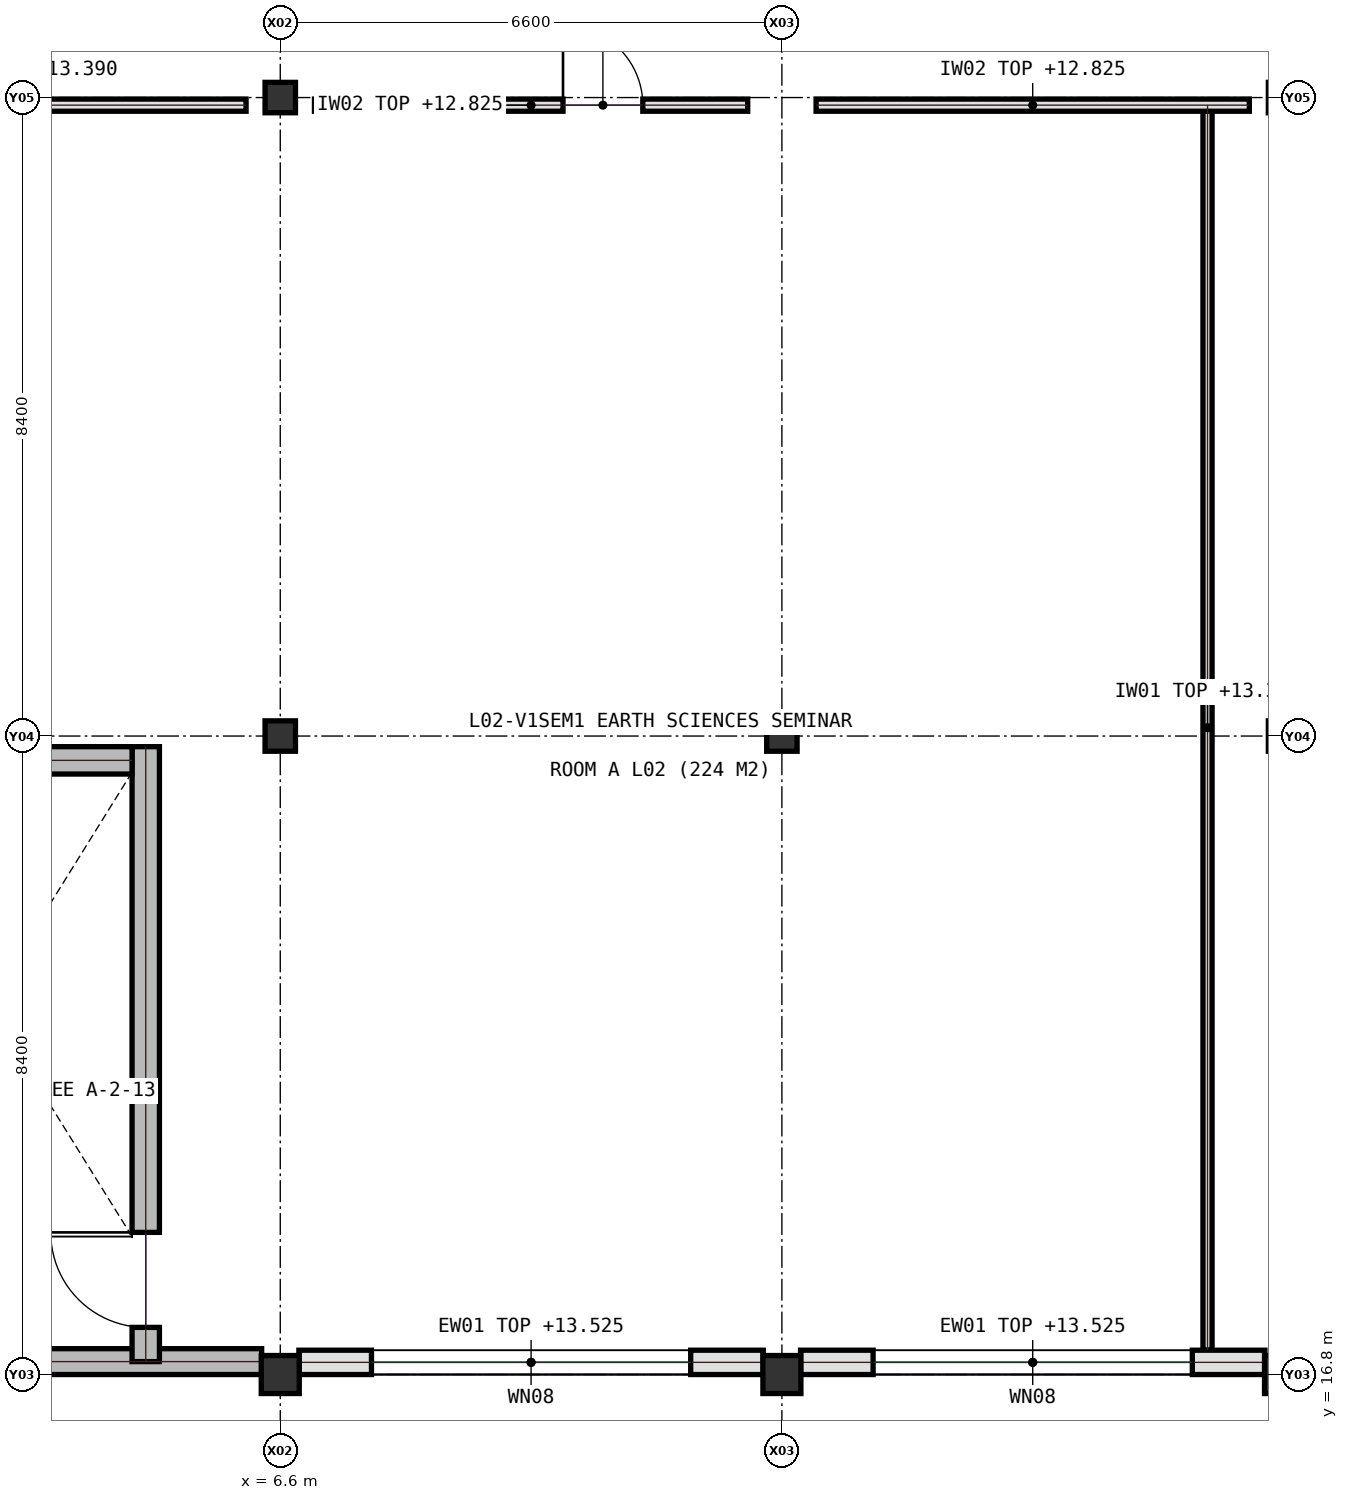
"""IFC4 building model, lengths in metres.
Left out: names, types, materials, properties, quantities, classifications, styles, units other than length and angle.
Written with IfcOpenShell. Run it as: python <this file> out.ifc"""

import sys

from ifc_helpers import new_model, si_unit, direction, frame, frame_2d, origin, origin_2d, place, context, subcontext, project, spatial, rectangle, extrude, element, fill, save


model = new_model("IFC4")
c1 = context("Model", 3, precision=1e-05, world=origin(), true_north=direction((0.0, 1.0)))
c2 = subcontext(c1, "Body", "Model", "MODEL_VIEW")
j1 = project(units=[si_unit("LENGTHUNIT", "METRE"), si_unit("PLANEANGLEUNIT", "RADIAN")], contexts=[c1])
p1 = place(None, origin())
s1 = spatial("IfcSite", under=j1, at=p1, CompositionType="ELEMENT")
p2 = place(p1, origin())
s2 = spatial("IfcBuilding", under=s1, at=p2, CompositionType="ELEMENT")
p3 = place(p2, frame((0.0, 0.0, 9.9)))
s3 = spatial("IfcBuildingStorey", under=s2, at=p3, CompositionType="ELEMENT", Elevation=9.9)
p4 = place(p3, frame((6.6, 16.8, 0.0), z_axis=(0.0, 0.0, 1.0), x_axis=(1.0, 0.0, 0.0)))
e1 = element("IfcColumn", 1, at=p4, inside=s3, PredefinedType="COLUMN", context=c2, shape_type="SweptSolid", body=[
    extrude(rectangle(XDim=0.5, YDim=0.5, at=origin_2d()), origin(), (0.0, 0.0, 1.0), 4.5),
])
for number, where, z_axis, x_axis in (
    (2, (6.6, 25.2, 0.0), (0.0, 0.0, 1.0), (1.0, 0.0, 0.0)),
    (3, (6.6, 33.6, 0.0), (0.0, 0.0, 1.0), (1.0, 0.0, 0.0)),
):
    element("IfcColumn", number, at=place(p3, frame(where, z_axis=z_axis, x_axis=x_axis)), inside=s3, PredefinedType="COLUMN", context=c2, shape_type="SweptSolid", body=[
        extrude(rectangle(XDim=0.4, YDim=0.4, at=origin_2d()), origin(), (0.0, 0.0, 1.0), 4.5),
    ])
p5 = place(p3, frame((13.2, 16.8, 0.0), z_axis=(0.0, 0.0, 1.0), x_axis=(1.0, 0.0, 0.0)))
e4 = element("IfcColumn", 4, at=p5, inside=s3, PredefinedType="COLUMN", context=c2, shape_type="SweptSolid", body=[
    extrude(rectangle(XDim=0.5, YDim=0.5, at=origin_2d()), origin(), (0.0, 0.0, 1.0), 4.5),
])
p6 = place(p3, frame((13.2, 25.2, 0.0), z_axis=(0.0, 0.0, 1.0), x_axis=(1.0, 0.0, 0.0)))
e5 = element("IfcColumn", 5, at=p6, inside=s3, PredefinedType="COLUMN", context=c2, shape_type="SweptSolid", body=[
    extrude(rectangle(XDim=0.4, YDim=0.4, at=origin_2d()), origin(), (0.0, 0.0, 1.0), 4.5),
])
p7 = place(p3, frame((19.8, 16.8, 0.0), z_axis=(0.0, 0.0, 1.0), x_axis=(1.0, 0.0, 0.0)))
e6 = element("IfcColumn", 6, at=p7, inside=s3, PredefinedType="COLUMN", context=c2, shape_type="SweptSolid", body=[
    extrude(rectangle(XDim=0.5, YDim=0.5, at=origin_2d()), origin(), (0.0, 0.0, 1.0), 4.5),
])
p8 = place(p3, frame((18.8, 17.12, 0.0), z_axis=(0.0, 0.0, 1.0), x_axis=(0.0, 1.0, 0.0)))
e7 = element("IfcWall", 7, at=p8, inside=s3, PredefinedType="PARTITIONING", context=c2, shape_type="SweptSolid", body=[
    extrude(rectangle(XDim=16.38, YDim=0.12, at=frame_2d((8.19, 0.0))), origin(), (0.0, 0.0, 1.0), 3.49),
])
p9 = place(p3, frame((0.32, 33.5, 0.0), z_axis=(0.0, 0.0, 1.0), x_axis=(1.0, 0.0, 0.0)))
e8 = element("IfcWall", 8, at=p9, inside=s3, PredefinedType="PARTITIONING", context=c2, shape_type="SweptSolid", body=[
    extrude(rectangle(XDim=5.83, YDim=0.16, at=frame_2d((2.915, 0.0))), origin(), (0.0, 0.0, 1.0), 3.49),
])
p10 = place(p3, frame((7.05, 33.5, 0.0), z_axis=(0.0, 0.0, 1.0), x_axis=(1.0, 0.0, 0.0)))
e9 = element("IfcWall", 9, at=p10, inside=s3, PredefinedType="PARTITIONING", context=c2, shape_type="SweptSolid", body=[
    extrude(rectangle(XDim=5.7, YDim=0.16, at=frame_2d((2.85, 0.0))), origin(), (0.0, 0.0, 1.0), 2.925),
])
p11 = place(p10, frame((3.27, 0.0, 0.0)))
e10 = element("IfcOpeningElement", 10, at=p11, cuts=e9, PredefinedType="OPENING", context=c2, shape_type="SweptSolid", body=[
    extrude(rectangle(XDim=1.05, YDim=2.15, at=frame_2d((0.525, 1.075))), frame((0.0, 0.09, 0.0), z_axis=(0.0, -1.0, 0.0), x_axis=(1.0, 0.0, 0.0)), (0.0, 0.0, 1.0), 0.18),
])
p12 = place(p3, frame((13.65, 33.5, 0.0), z_axis=(0.0, 0.0, 1.0), x_axis=(1.0, 0.0, 0.0)))
e11 = element("IfcWall", 11, at=p12, inside=s3, PredefinedType="PARTITIONING", context=c2, shape_type="SweptSolid", body=[
    extrude(rectangle(XDim=5.7, YDim=0.16, at=frame_2d((2.85, 0.0))), origin(), (0.0, 0.0, 1.0), 2.925),
])
p13 = place(p3, frame((0.245, 16.97, 0.0), z_axis=(0.0, 0.0, 1.0), x_axis=(1.0, 0.0, 0.0)))
e12 = element("IfcWall", 12, at=p13, inside=s3, PredefinedType="SHEAR", context=c2, shape_type="SweptSolid", body=[
    extrude(rectangle(XDim=6.11, YDim=0.34, at=frame_2d((3.055, 0.0))), origin(), (0.0, 0.0, 1.0), 4.24),
])
p14 = place(p3, frame((6.845, 16.96, 0.0), z_axis=(0.0, 0.0, 1.0), x_axis=(1.0, 0.0, 0.0)))
e13 = element("IfcWall", 13, at=p14, inside=s3, PredefinedType="SOLIDWALL", context=c2, shape_type="SweptSolid", body=[
    extrude(rectangle(XDim=6.11, YDim=0.32, at=frame_2d((3.055, 0.0))), origin(), (0.0, 0.0, 1.0), 3.625),
])
p15 = place(p14, frame((0.955, 0.0, 1.45)))
e14 = element("IfcOpeningElement", 14, at=p15, cuts=e13, PredefinedType="OPENING", context=c2, shape_type="SweptSolid", body=[
    extrude(rectangle(XDim=4.2, YDim=1.1, at=frame_2d((2.1, 0.55))), frame((0.0, 0.17, 0.0), z_axis=(0.0, -1.0, 0.0), x_axis=(1.0, 0.0, 0.0)), (0.0, 0.0, 1.0), 0.34),
])
p16 = place(p3, frame((13.445, 16.96, 0.0), z_axis=(0.0, 0.0, 1.0), x_axis=(1.0, 0.0, 0.0)))
e15 = element("IfcWall", 15, at=p16, inside=s3, PredefinedType="SOLIDWALL", context=c2, shape_type="SweptSolid", body=[
    extrude(rectangle(XDim=6.11, YDim=0.32, at=frame_2d((3.055, 0.0))), origin(), (0.0, 0.0, 1.0), 3.625),
])
p17 = place(p16, frame((0.955, 0.0, 1.45)))
e16 = element("IfcOpeningElement", 16, at=p17, cuts=e15, PredefinedType="OPENING", context=c2, shape_type="SweptSolid", body=[
    extrude(rectangle(XDim=4.2, YDim=1.1, at=frame_2d((2.1, 0.55))), frame((0.0, 0.17, 0.0), z_axis=(0.0, -1.0, 0.0), x_axis=(1.0, 0.0, 0.0)), (0.0, 0.0, 1.0), 0.34),
])
p18 = place(p3, frame((4.83, 16.97, 0.0), z_axis=(0.0, 0.0, 1.0), x_axis=(0.0, 1.0, 0.0)))
e17 = element("IfcWall", 17, at=p18, inside=s3, PredefinedType="SHEAR", context=c2, shape_type="SweptSolid", body=[
    extrude(rectangle(XDim=8.09, YDim=0.36, at=frame_2d((4.045, 0.0))), origin(), (0.0, 0.0, 1.0), 4.24),
])
p19 = place(p18, frame((0.45, 0.0, 0.0)))
e18 = element("IfcOpeningElement", 18, at=p19, cuts=e17, PredefinedType="OPENING", context=c2, shape_type="SweptSolid", body=[
    extrude(rectangle(XDim=1.25, YDim=2.15, at=frame_2d((0.625, 1.075))), frame((0.0, 0.19, 0.0), z_axis=(0.0, -1.0, 0.0), x_axis=(1.0, 0.0, 0.0)), (0.0, 0.0, 1.0), 0.38),
])
p20 = place(p3, frame((0.85, 24.88, 0.0), z_axis=(0.0, 0.0, 1.0), x_axis=(1.0, 0.0, 0.0)))
e19 = element("IfcWall", 19, at=p20, inside=s3, PredefinedType="SHEAR", context=c2, shape_type="SweptSolid", body=[
    extrude(rectangle(XDim=3.8, YDim=0.36, at=frame_2d((1.9, 0.0))), origin(), (0.0, 0.0, 1.0), 4.24),
])
p21 = place(p11, origin())
e20 = element("IfcDoor", 20, at=p21, inside=s3, OperationType="SINGLE_SWING_LEFT", PredefinedType="DOOR", context=c2, shape_type="SweptSolid", body=[
    extrude(rectangle(XDim=1.05, YDim=2.15, at=frame_2d((0.525, 1.075))), frame((0.0, 0.025, 0.0), z_axis=(0.0, -1.0, 0.0), x_axis=(1.0, 0.0, 0.0)), (0.0, 0.0, 1.0), 0.05),
])
fill(e10, e20)
p22 = place(p15, origin())
e21 = element("IfcWindow", 21, at=p22, inside=s3, PartitioningType="SINGLE_PANEL", PredefinedType="WINDOW", context=c2, shape_type="SweptSolid", body=[
    extrude(rectangle(XDim=4.2, YDim=1.1, at=frame_2d((2.1, 0.55))), frame((0.0, 0.03, 0.0), z_axis=(0.0, -1.0, 0.0), x_axis=(1.0, 0.0, 0.0)), (0.0, 0.0, 1.0), 0.06),
])
fill(e14, e21)
p23 = place(p17, origin())
e22 = element("IfcWindow", 22, at=p23, inside=s3, PartitioningType="SINGLE_PANEL", PredefinedType="WINDOW", context=c2, shape_type="SweptSolid", body=[
    extrude(rectangle(XDim=4.2, YDim=1.1, at=frame_2d((2.1, 0.55))), frame((0.0, 0.03, 0.0), z_axis=(0.0, -1.0, 0.0), x_axis=(1.0, 0.0, 0.0)), (0.0, 0.0, 1.0), 0.06),
])
fill(e16, e22)
p24 = place(p19, origin())
e23 = element("IfcDoor", 23, at=p24, inside=s3, OperationType="SINGLE_SWING_RIGHT", PredefinedType="DOOR", context=c2, shape_type="SweptSolid", body=[
    extrude(rectangle(XDim=1.25, YDim=2.15, at=frame_2d((0.625, 1.075))), frame((0.0, 0.025, 0.0), z_axis=(0.0, -1.0, 0.0), x_axis=(1.0, 0.0, 0.0)), (0.0, 0.0, 1.0), 0.05),
])
fill(e18, e23)
save(model, sys.argv[1])
